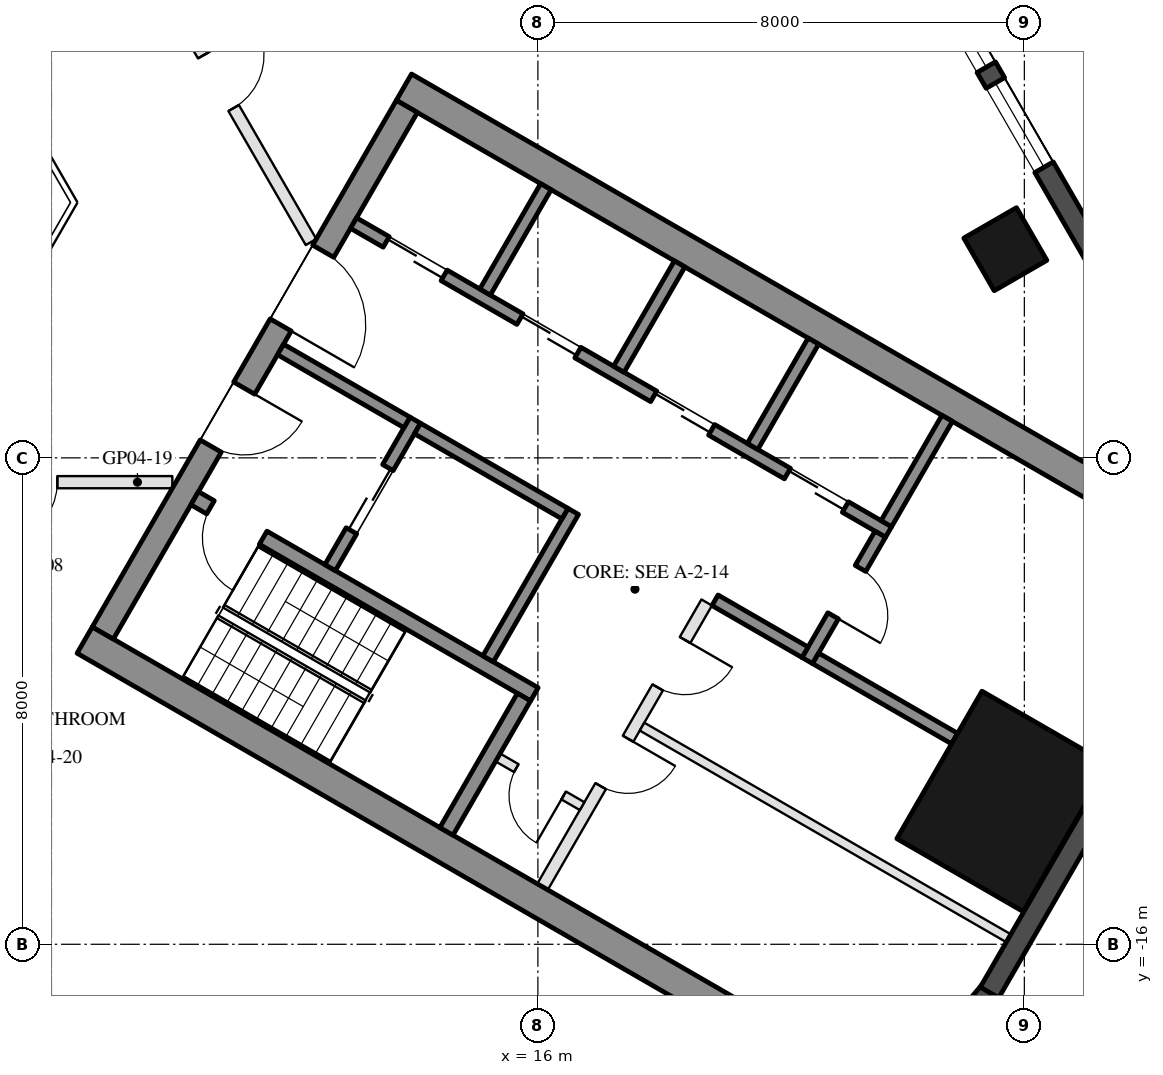
"""IFC4 building model, lengths in metres.
Left out: names, types, materials, properties, quantities, classifications, styles, units other than length and angle.
Written with IfcOpenShell. Run it as: python <this file> out.ifc"""

import sys

from ifc_helpers import new_model, si_unit, direction, frame, frame_2d, origin, origin_2d, place, context, subcontext, project, spatial, rectangle, hollow_rectangle, extrude, element, fill, save


model = new_model("IFC4")
c1 = context("Model", 3, precision=1e-05, world=origin(), true_north=direction((0.0, 1.0)))
c2 = subcontext(c1, "Body", "Model", "MODEL_VIEW")
j1 = project(units=[si_unit("LENGTHUNIT", "METRE"), si_unit("PLANEANGLEUNIT", "RADIAN")], contexts=[c1])
p1 = place(None, origin())
s1 = spatial("IfcSite", under=j1, at=p1, CompositionType="ELEMENT")
p2 = place(p1, origin())
s2 = spatial("IfcBuilding", under=s1, at=p2, CompositionType="ELEMENT")
p3 = place(p2, frame((0.0, 0.0, 72.4)))
s3 = spatial("IfcBuildingStorey", under=s2, at=p3, CompositionType="ELEMENT", Elevation=72.4)
p4 = place(p3, frame((23.688, -4.568, 0.0), z_axis=(0.0, 0.0, 1.0), x_axis=(-0.5, 0.866025403784, 0.0)))
e1 = element("IfcColumn", 1, at=p4, inside=s3, PredefinedType="COLUMN", context=c2, shape_type="SweptSolid", body=[
    extrude(hollow_rectangle(XDim=1.0, YDim=1.0, WallThickness=0.045, at=origin_2d()), origin(), (0.0, 0.0, 1.0), 3.7),
])
p5 = place(p3, frame((23.643, -13.65, 0.0), z_axis=(0.0, 0.0, 1.0), x_axis=(0.5, 0.866025403784, 0.0)))
e2 = element("IfcColumn", 2, at=p5, inside=s3, PredefinedType="COLUMN", context=c2, shape_type="SweptSolid", body=[
    extrude(hollow_rectangle(XDim=2.8, YDim=2.4, WallThickness=0.07, at=origin_2d()), origin(), (0.0, 0.0, 1.0), 3.7),
])
p6 = place(p3, frame((22.217, -18.231, 0.0), z_axis=(0.0, 0.0, 1.0), x_axis=(0.642733291068, 0.76609001857, 0.0)))
e3 = element("IfcWall", 3, at=p6, inside=s3, PredefinedType="SOLIDWALL", context=c2, shape_type="SweptSolid", body=[
    extrude(rectangle(XDim=1.91, YDim=0.35, at=frame_2d((0.955, 0.0))), origin(), (0.0, 0.0, 1.0), 3.55),
])
p7 = place(p3, frame((23.427, -16.792, 0.0), z_axis=(0.0, 0.0, 1.0), x_axis=(0.500018773155, 0.866014564827, 0.0)))
e4 = element("IfcWall", 4, at=p7, inside=s3, PredefinedType="SOLIDWALL", context=c2, shape_type="SweptSolid", body=[
    extrude(rectangle(XDim=5.658, YDim=0.35, at=frame_2d((2.829, 0.0))), origin(), (0.0, 0.0, 1.0), 3.55),
])
p8 = place(p3, frame((26.257, -6.567, 0.0), z_axis=(0.0, 0.0, 1.0), x_axis=(-0.500023526245, 0.866011820475, 0.0)))
e5 = element("IfcWall", 5, at=p8, inside=s3, PredefinedType="SOLIDWALL", context=c2, shape_type="SweptSolid", body=[
    extrude(rectangle(XDim=11.816, YDim=0.35, at=frame_2d((5.908, 0.0))), origin(), (0.0, 0.0, 1.0), 3.55),
])
p9 = place(p8, frame((0.38, 0.0, 0.3)))
e6 = element("IfcOpeningElement", 6, at=p9, cuts=e5, PredefinedType="OPENING", context=c2, shape_type="SweptSolid", body=[
    extrude(rectangle(XDim=1.7, YDim=2.65, at=frame_2d((0.85, 1.325))), frame((0.0, 0.185, 0.0), z_axis=(0.0, -1.0, 0.0), x_axis=(1.0, 0.0, 0.0)), (0.0, 0.0, 1.0), 0.37),
])
p10 = place(p8, frame((7.666, 0.0, 0.0)))
e7 = element("IfcOpeningElement", 7, at=p10, cuts=e5, PredefinedType="OPENING", context=c2, shape_type="SweptSolid", body=[
    extrude(rectangle(XDim=2.4, YDim=2.4, at=frame_2d((1.2, 1.2))), frame((0.0, 0.185, 0.0), z_axis=(0.0, -1.0, 0.0), x_axis=(1.0, 0.0, 0.0)), (0.0, 0.0, 1.0), 0.37),
])
p11 = place(p8, frame((3.865, 0.0, 0.3)))
e8 = element("IfcOpeningElement", 8, at=p11, cuts=e5, PredefinedType="OPENING", context=c2, shape_type="SweptSolid", body=[
    extrude(rectangle(XDim=1.6, YDim=2.65, at=frame_2d((0.8, 1.325))), frame((0.0, 0.185, 0.0), z_axis=(0.0, -1.0, 0.0), x_axis=(1.0, 0.0, 0.0)), (0.0, 0.0, 1.0), 0.37),
])
p12 = place(p8, frame((5.765, 0.0, 0.3)))
e9 = element("IfcOpeningElement", 9, at=p12, cuts=e5, PredefinedType="OPENING", context=c2, shape_type="SweptSolid", body=[
    extrude(rectangle(XDim=1.6, YDim=2.65, at=frame_2d((0.8, 1.325))), frame((0.0, 0.185, 0.0), z_axis=(0.0, -1.0, 0.0), x_axis=(1.0, 0.0, 0.0)), (0.0, 0.0, 1.0), 0.37),
])
for number, where, z_axis, x_axis in (
    (10, (8.547, -10.997, 0.0), (0.0, 0.0, 1.0), (0.866, -0.5, 0.0)),
    (11, (13.797, -1.903, 0.0), (0.0, 0.0, 1.0), (0.866, -0.5, 0.0)),
):
    element("IfcWall", number, at=place(p3, frame(where, z_axis=z_axis, x_axis=x_axis)), inside=s3, PredefinedType="SHEAR", context=c2, shape_type="SweptSolid", body=[
        extrude(rectangle(XDim=14.837, YDim=0.5, at=frame_2d((7.418, 0.0))), origin(), (0.0, 0.0, 1.0), 3.5),
    ])
p13 = place(p3, frame((8.845, -10.88, 0.0), z_axis=(0.0, 0.0, 1.0), x_axis=(0.500004234368, 0.866022959057, 0.0)))
e12 = element("IfcWall", 12, at=p13, inside=s3, PredefinedType="SHEAR", context=c2, shape_type="SweptSolid", body=[
    extrude(rectangle(XDim=10.0, YDim=0.4, at=frame_2d((5.0, 0.0))), origin(), (0.0, 0.0, 1.0), 3.5),
])
p14 = place(p13, frame((3.55, 0.0, 0.0)))
e13 = element("IfcOpeningElement", 13, at=p14, cuts=e12, PredefinedType="OPENING", context=c2, shape_type="SweptSolid", body=[
    extrude(rectangle(XDim=1.1, YDim=2.1, at=frame_2d((0.55, 1.05))), frame((0.0, 0.21, 0.0), z_axis=(0.0, -1.0, 0.0), x_axis=(1.0, 0.0, 0.0)), (0.0, 0.0, 1.0), 0.42),
])
p15 = place(p13, frame((5.85, 0.0, 0.0)))
e14 = element("IfcOpeningElement", 14, at=p15, cuts=e12, PredefinedType="OPENING", context=c2, shape_type="SweptSolid", body=[
    extrude(rectangle(XDim=1.4, YDim=2.1, at=frame_2d((0.7, 1.05))), frame((0.0, 0.21, 0.0), z_axis=(0.0, -1.0, 0.0), x_axis=(1.0, 0.0, 0.0)), (0.0, 0.0, 1.0), 0.42),
])
p16 = place(p3, frame((10.356, -8.664, 0.0), z_axis=(0.0, 0.0, 1.0), x_axis=(0.866028629588, -0.499994412703, 0.0)))
e15 = element("IfcWall", 15, at=p16, inside=s3, PredefinedType="SHEAR", context=c2, shape_type="SweptSolid", body=[
    extrude(rectangle(XDim=6.45, YDim=0.25, at=frame_2d((3.225, 0.0))), origin(), (0.0, 0.0, 1.0), 3.5),
])
p17 = place(p16, frame((0.3, 0.0, 0.0)))
e16 = element("IfcOpeningElement", 16, at=p17, cuts=e15, PredefinedType="OPENING", context=c2, shape_type="SweptSolid", body=[
    extrude(rectangle(XDim=1.0, YDim=2.1, at=frame_2d((0.5, 1.05))), frame((0.0, 0.135, 0.0), z_axis=(0.0, -1.0, 0.0), x_axis=(1.0, 0.0, 0.0)), (0.0, 0.0, 1.0), 0.27),
])
p18 = place(p3, frame((14.496, -14.143, 0.0), z_axis=(0.0, 0.0, 1.0), x_axis=(0.500062241894, 0.865989465428, 0.0)))
e17 = element("IfcWall", 17, at=p18, inside=s3, PredefinedType="SHEAR", context=c2, shape_type="SweptSolid", body=[
    extrude(rectangle(XDim=2.55, YDim=0.25, at=frame_2d((1.275, 0.0))), origin(), (0.0, 0.0, 1.0), 3.5),
])
p19 = place(p3, frame((15.181, -11.305, 0.0), z_axis=(0.0, 0.0, 1.0), x_axis=(0.49994636267, 0.866056369097, 0.0)))
e18 = element("IfcWall", 18, at=p19, inside=s3, PredefinedType="SHEAR", context=c2, shape_type="SweptSolid", body=[
    extrude(rectangle(XDim=2.8, YDim=0.2, at=frame_2d((1.4, 0.0))), origin(), (0.0, 0.0, 1.0), 3.5),
])
p20 = place(p3, frame((12.583, -9.805, 0.0), z_axis=(0.0, 0.0, 1.0), x_axis=(0.49994636267, 0.866056369097, 0.0)))
e19 = element("IfcWall", 19, at=p20, inside=s3, PredefinedType="SHEAR", context=c2, shape_type="SweptSolid", body=[
    extrude(rectangle(XDim=2.8, YDim=0.2, at=frame_2d((1.4, 0.0))), origin(), (0.0, 0.0, 1.0), 3.5),
])
p21 = place(p20, frame((0.7, 0.0, 0.0)))
e20 = element("IfcOpeningElement", 20, at=p21, cuts=e19, PredefinedType="OPENING", context=c2, shape_type="SweptSolid", body=[
    extrude(rectangle(XDim=1.2, YDim=2.1, at=frame_2d((0.6, 1.05))), frame((0.0, 0.11, 0.0), z_axis=(0.0, -1.0, 0.0), x_axis=(1.0, 0.0, 0.0)), (0.0, 0.0, 1.0), 0.22),
])
p22 = place(p3, frame((11.768, -6.217, 0.0), z_axis=(0.0, 0.0, 1.0), x_axis=(0.866050077142, -0.499957262057, 0.0)))
e21 = element("IfcWall", 21, at=p22, inside=s3, PredefinedType="SHEAR", context=c2, shape_type="SweptSolid", body=[
    extrude(rectangle(XDim=2.4, YDim=0.2, at=frame_2d((1.2, 0.0))), origin(), (0.0, 0.0, 1.0), 3.5),
])
p23 = place(p3, frame((14.02, -7.517, 0.0), z_axis=(0.0, 0.0, 1.0), x_axis=(0.866034573852, -0.49998411664, 0.0)))
e22 = element("IfcWall", 22, at=p23, inside=s3, PredefinedType="SHEAR", context=c2, shape_type="SweptSolid", body=[
    extrude(rectangle(XDim=2.8, YDim=0.2, at=frame_2d((1.4, 0.0))), origin(), (0.0, 0.0, 1.0), 3.5),
])
p24 = place(p3, frame((12.968, -4.138, 0.0), z_axis=(0.0, 0.0, 1.0), x_axis=(0.866028328073, -0.49999493495, 0.0)))
e23 = element("IfcWall", 23, at=p24, inside=s3, PredefinedType="SHEAR", context=c2, shape_type="SweptSolid", body=[
    extrude(rectangle(XDim=10.16, YDim=0.2, at=frame_2d((5.08, 0.0))), origin(), (0.0, 0.0, 1.0), 3.5),
])
p25 = place(p24, frame((0.62, 0.0, 0.0)))
e24 = element("IfcOpeningElement", 24, at=p25, cuts=e23, PredefinedType="OPENING", context=c2, shape_type="SweptSolid", body=[
    extrude(rectangle(XDim=1.1, YDim=2.1, at=frame_2d((0.55, 1.05))), frame((0.0, 0.11, 0.0), z_axis=(0.0, -1.0, 0.0), x_axis=(1.0, 0.0, 0.0)), (0.0, 0.0, 1.0), 0.22),
])
p26 = place(p24, frame((3.16, 0.0, 0.0)))
e25 = element("IfcOpeningElement", 25, at=p26, cuts=e23, PredefinedType="OPENING", context=c2, shape_type="SweptSolid", body=[
    extrude(rectangle(XDim=1.1, YDim=2.1, at=frame_2d((0.55, 1.05))), frame((0.0, 0.11, 0.0), z_axis=(0.0, -1.0, 0.0), x_axis=(1.0, 0.0, 0.0)), (0.0, 0.0, 1.0), 0.22),
])
p27 = place(p24, frame((5.7, 0.0, 0.0)))
e26 = element("IfcOpeningElement", 26, at=p27, cuts=e23, PredefinedType="OPENING", context=c2, shape_type="SweptSolid", body=[
    extrude(rectangle(XDim=1.1, YDim=2.1, at=frame_2d((0.55, 1.05))), frame((0.0, 0.11, 0.0), z_axis=(0.0, -1.0, 0.0), x_axis=(1.0, 0.0, 0.0)), (0.0, 0.0, 1.0), 0.22),
])
p28 = place(p24, frame((8.24, 0.0, 0.0)))
e27 = element("IfcOpeningElement", 27, at=p28, cuts=e23, PredefinedType="OPENING", context=c2, shape_type="SweptSolid", body=[
    extrude(rectangle(XDim=1.1, YDim=2.1, at=frame_2d((0.55, 1.05))), frame((0.0, 0.11, 0.0), z_axis=(0.0, -1.0, 0.0), x_axis=(1.0, 0.0, 0.0)), (0.0, 0.0, 1.0), 0.22),
])
p29 = place(p3, frame((20.43, -11.333, 0.0), z_axis=(0.0, 0.0, 1.0), x_axis=(0.500001309137, 0.866024647952, 0.0)))
e28 = element("IfcWall", 28, at=p29, inside=s3, PredefinedType="SHEAR", context=c2, shape_type="SweptSolid", body=[
    extrude(rectangle(XDim=2.4, YDim=0.2, at=frame_2d((1.2, 0.0))), origin(), (0.0, 0.0, 1.0), 3.5),
])
p30 = place(p29, frame((0.85, 0.0, 0.0)))
e29 = element("IfcOpeningElement", 29, at=p30, cuts=e28, PredefinedType="OPENING", context=c2, shape_type="SweptSolid", body=[
    extrude(rectangle(XDim=0.9, YDim=2.1, at=frame_2d((0.45, 1.05))), frame((0.0, 0.11, 0.0), z_axis=(0.0, -1.0, 0.0), x_axis=(1.0, 0.0, 0.0)), (0.0, 0.0, 1.0), 0.22),
])
p31 = place(p3, frame((18.913, -10.342, 0.0), z_axis=(0.0, 0.0, 1.0), x_axis=(0.866038183914, -0.499977863513, 0.0)))
e30 = element("IfcWall", 30, at=p31, inside=s3, PredefinedType="SHEAR", context=c2, shape_type="SweptSolid", body=[
    extrude(rectangle(XDim=1.71, YDim=0.2, at=frame_2d((0.855, 0.0))), origin(), (0.0, 0.0, 1.0), 3.5),
])
for number, where, z_axis, x_axis in (
    (31, (15.131, -5.272, 0.0), (0.0, 0.0, 1.0), (0.5, 0.866, 0.0)),
    (32, (17.331, -6.542, 0.0), (0.0, 0.0, 1.0), (0.5, 0.866, 0.0)),
    (33, (19.531, -7.812, 0.0), (0.0, 0.0, 1.0), (0.5, 0.866, 0.0)),
    (34, (21.73, -9.082, 0.0), (0.0, 0.0, 1.0), (0.5, 0.866, 0.0)),
):
    element("IfcWall", number, at=place(p3, frame(where, z_axis=z_axis, x_axis=x_axis)), inside=s3, PredefinedType="SHEAR", context=c2, shape_type="SweptSolid", body=[
        extrude(rectangle(XDim=2.0, YDim=0.2, at=frame_2d((1.0, 0.0))), origin(), (0.0, 0.0, 1.0), 3.5),
    ])
p32 = place(p3, frame((20.567, -11.297, 0.0), z_axis=(0.0, 0.0, 1.0), x_axis=(0.866060851709, -0.499938597367, 0.0)))
e35 = element("IfcWall", 35, at=p32, inside=s3, PredefinedType="SHEAR", context=c2, shape_type="SweptSolid", body=[
    extrude(rectangle(XDim=2.64, YDim=0.2, at=frame_2d((1.32, 0.0))), origin(), (0.0, 0.0, 1.0), 3.5),
])
p33 = place(p3, frame((16.076, -15.055, 0.0), z_axis=(0.0, 0.0, 1.0), x_axis=(0.499995103361, 0.866028230842, 0.0)))
e36 = element("IfcWall", 36, at=p33, inside=s3, PredefinedType="PARTITIONING", context=c2, shape_type="SweptSolid", body=[
    extrude(rectangle(XDim=5.4, YDim=0.2, at=frame_2d((2.7, 0.0))), origin(), (0.0, 0.0, 1.0), 3.5),
])
p34 = place(p33, frame((1.913, 0.0, 0.0)))
e37 = element("IfcOpeningElement", 37, at=p34, cuts=e36, PredefinedType="OPENING", context=c2, shape_type="SweptSolid", body=[
    extrude(rectangle(XDim=0.9, YDim=2.1, at=frame_2d((0.45, 1.05))), frame((0.0, 0.11, 0.0), z_axis=(0.0, -1.0, 0.0), x_axis=(1.0, 0.0, 0.0)), (0.0, 0.0, 1.0), 0.22),
])
p35 = place(p33, frame((3.788, 0.0, 0.0)))
e38 = element("IfcOpeningElement", 38, at=p35, cuts=e36, PredefinedType="OPENING", context=c2, shape_type="SweptSolid", body=[
    extrude(rectangle(XDim=0.9, YDim=2.1, at=frame_2d((0.45, 1.05))), frame((0.0, 0.11, 0.0), z_axis=(0.0, -1.0, 0.0), x_axis=(1.0, 0.0, 0.0)), (0.0, 0.0, 1.0), 0.22),
])
p36 = place(p3, frame((15.342, -12.928, 0.0), z_axis=(0.0, 0.0, 1.0), x_axis=(0.865989903783, -0.500061482766, 0.0)))
e39 = element("IfcWall", 39, at=p36, inside=s3, PredefinedType="PARTITIONING", context=c2, shape_type="SweptSolid", body=[
    extrude(rectangle(XDim=1.6, YDim=0.15, at=frame_2d((0.8, 0.0))), origin(), (0.0, 0.0, 1.0), 3.5),
])
p37 = place(p36, frame((0.35, 0.0, 0.0)))
e40 = element("IfcOpeningElement", 40, at=p37, cuts=e39, PredefinedType="OPENING", context=c2, shape_type="SweptSolid", body=[
    extrude(rectangle(XDim=0.9, YDim=2.1, at=frame_2d((0.45, 1.05))), frame((0.0, 0.085, 0.0), z_axis=(0.0, -1.0, 0.0), x_axis=(1.0, 0.0, 0.0)), (0.0, 0.0, 1.0), 0.17),
])
p38 = place(p3, frame((17.713, -12.42, 0.0), z_axis=(0.0, 0.0, 1.0), x_axis=(0.866016523273, -0.500015381182, 0.0)))
e41 = element("IfcWall", 41, at=p38, inside=s3, PredefinedType="PARTITIONING", context=c2, shape_type="SweptSolid", body=[
    extrude(rectangle(XDim=6.95, YDim=0.15, at=frame_2d((3.475, 0.0))), origin(), (0.0, 0.0, 1.0), 3.5),
])
p39 = place(p3, frame((9.988, -8.4, 0.0), z_axis=(0.0, 0.0, 1.0), x_axis=(-1.0, 0.0, 0.0)))
e42 = element("IfcWall", 42, at=p39, inside=s3, PredefinedType="PARTITIONING", context=c2, shape_type="SweptSolid", body=[
    extrude(rectangle(XDim=4.783, YDim=0.2, at=frame_2d((2.392, 0.0))), origin(), (0.0, 0.0, 1.0), 2.95),
])
p40 = place(p39, frame((1.892, 0.0, 0.0)))
e43 = element("IfcOpeningElement", 43, at=p40, cuts=e42, PredefinedType="OPENING", context=c2, shape_type="SweptSolid", body=[
    extrude(rectangle(XDim=1.0, YDim=2.1, at=frame_2d((0.5, 1.05))), frame((0.0, 0.11, 0.0), z_axis=(0.0, -1.0, 0.0), x_axis=(1.0, 0.0, 0.0)), (0.0, 0.0, 1.0), 0.22),
])
p41 = place(p3, frame((9.224, 0.824, 0.0), z_axis=(0.0, 0.0, 1.0), x_axis=(0.500019749946, -0.866014000848, 0.0)))
e44 = element("IfcWall", 44, at=p41, inside=s3, PredefinedType="PARTITIONING", context=c2, shape_type="SweptSolid", body=[
    extrude(rectangle(XDim=6.09, YDim=0.2, at=frame_2d((3.045, 0.0))), origin(), (0.0, 0.0, 1.0), 2.95),
])
p42 = place(p41, frame((2.545, 0.0, 0.0)))
e45 = element("IfcOpeningElement", 45, at=p42, cuts=e44, PredefinedType="OPENING", context=c2, shape_type="SweptSolid", body=[
    extrude(rectangle(XDim=1.0, YDim=2.1, at=frame_2d((0.5, 1.05))), frame((0.0, 0.11, 0.0), z_axis=(0.0, -1.0, 0.0), x_axis=(1.0, 0.0, 0.0)), (0.0, 0.0, 1.0), 0.22),
])
p43 = place(p11, origin())
e46 = element("IfcWindow", 46, at=p43, inside=s3, PartitioningType="SINGLE_PANEL", PredefinedType="WINDOW", context=c2, shape_type="SweptSolid", body=[
    extrude(rectangle(XDim=1.6, YDim=2.65, at=frame_2d((0.8, 1.325))), frame((0.0, 0.03, 0.0), z_axis=(0.0, -1.0, 0.0), x_axis=(1.0, 0.0, 0.0)), (0.0, 0.0, 1.0), 0.06),
])
fill(e8, e46)
p44 = place(p12, origin())
e47 = element("IfcWindow", 47, at=p44, inside=s3, PartitioningType="SINGLE_PANEL", PredefinedType="WINDOW", context=c2, shape_type="SweptSolid", body=[
    extrude(rectangle(XDim=1.6, YDim=2.65, at=frame_2d((0.8, 1.325))), frame((0.0, 0.03, 0.0), z_axis=(0.0, -1.0, 0.0), x_axis=(1.0, 0.0, 0.0)), (0.0, 0.0, 1.0), 0.06),
])
fill(e9, e47)
p45 = place(p21, origin())
e48 = element("IfcDoor", 48, at=p45, inside=s3, OperationType="DOUBLE_DOOR_SLIDING", PredefinedType="DOOR", context=c2, shape_type="SweptSolid", body=[
    extrude(rectangle(XDim=1.2, YDim=2.1, at=frame_2d((0.6, 1.05))), frame((0.0, 0.025, 0.0), z_axis=(0.0, -1.0, 0.0), x_axis=(1.0, 0.0, 0.0)), (0.0, 0.0, 1.0), 0.05),
])
fill(e20, e48)
p46 = place(p37, frame((0.9, 0.0, 0.0), z_axis=(0.0, 0.0, 1.0), x_axis=(-1.0, 0.0, 0.0)))
e49 = element("IfcDoor", 49, at=p46, inside=s3, OperationType="SINGLE_SWING_LEFT", PredefinedType="DOOR", context=c2, shape_type="SweptSolid", body=[
    extrude(rectangle(XDim=0.9, YDim=2.1, at=frame_2d((0.45, 1.05))), frame((0.0, 0.025, 0.0), z_axis=(0.0, -1.0, 0.0), x_axis=(1.0, 0.0, 0.0)), (0.0, 0.0, 1.0), 0.05),
])
fill(e40, e49)
p47 = place(p25, origin())
e50 = element("IfcDoor", 50, at=p47, inside=s3, OperationType="DOUBLE_DOOR_SLIDING", PredefinedType="DOOR", context=c2, shape_type="SweptSolid", body=[
    extrude(rectangle(XDim=1.1, YDim=2.1, at=frame_2d((0.55, 1.05))), frame((0.0, 0.025, 0.0), z_axis=(0.0, -1.0, 0.0), x_axis=(1.0, 0.0, 0.0)), (0.0, 0.0, 1.0), 0.05),
])
fill(e24, e50)
p48 = place(p26, origin())
e51 = element("IfcDoor", 51, at=p48, inside=s3, OperationType="DOUBLE_DOOR_SLIDING", PredefinedType="DOOR", context=c2, shape_type="SweptSolid", body=[
    extrude(rectangle(XDim=1.1, YDim=2.1, at=frame_2d((0.55, 1.05))), frame((0.0, 0.025, 0.0), z_axis=(0.0, -1.0, 0.0), x_axis=(1.0, 0.0, 0.0)), (0.0, 0.0, 1.0), 0.05),
])
fill(e25, e51)
p49 = place(p27, origin())
e52 = element("IfcDoor", 52, at=p49, inside=s3, OperationType="DOUBLE_DOOR_SLIDING", PredefinedType="DOOR", context=c2, shape_type="SweptSolid", body=[
    extrude(rectangle(XDim=1.1, YDim=2.1, at=frame_2d((0.55, 1.05))), frame((0.0, 0.025, 0.0), z_axis=(0.0, -1.0, 0.0), x_axis=(1.0, 0.0, 0.0)), (0.0, 0.0, 1.0), 0.05),
])
fill(e26, e52)
p50 = place(p28, origin())
e53 = element("IfcDoor", 53, at=p50, inside=s3, OperationType="DOUBLE_DOOR_SLIDING", PredefinedType="DOOR", context=c2, shape_type="SweptSolid", body=[
    extrude(rectangle(XDim=1.1, YDim=2.1, at=frame_2d((0.55, 1.05))), frame((0.0, 0.025, 0.0), z_axis=(0.0, -1.0, 0.0), x_axis=(1.0, 0.0, 0.0)), (0.0, 0.0, 1.0), 0.05),
])
fill(e27, e53)
p51 = place(p30, frame((0.9, 0.0, 0.0), z_axis=(0.0, 0.0, 1.0), x_axis=(-1.0, 0.0, 0.0)))
e54 = element("IfcDoor", 54, at=p51, inside=s3, OperationType="SINGLE_SWING_RIGHT", PredefinedType="DOOR", context=c2, shape_type="SweptSolid", body=[
    extrude(rectangle(XDim=0.9, YDim=2.1, at=frame_2d((0.45, 1.05))), frame((0.0, 0.025, 0.0), z_axis=(0.0, -1.0, 0.0), x_axis=(1.0, 0.0, 0.0)), (0.0, 0.0, 1.0), 0.05),
])
fill(e29, e54)
p52 = place(p34, frame((0.9, 0.0, 0.0), z_axis=(0.0, 0.0, 1.0), x_axis=(-1.0, 0.0, 0.0)))
e55 = element("IfcDoor", 55, at=p52, inside=s3, OperationType="SINGLE_SWING_LEFT", PredefinedType="DOOR", context=c2, shape_type="SweptSolid", body=[
    extrude(rectangle(XDim=0.9, YDim=2.1, at=frame_2d((0.45, 1.05))), frame((0.0, 0.025, 0.0), z_axis=(0.0, -1.0, 0.0), x_axis=(1.0, 0.0, 0.0)), (0.0, 0.0, 1.0), 0.05),
])
fill(e37, e55)
p53 = place(p35, frame((0.9, 0.0, 0.0), z_axis=(0.0, 0.0, 1.0), x_axis=(-1.0, 0.0, 0.0)))
e56 = element("IfcDoor", 56, at=p53, inside=s3, OperationType="SINGLE_SWING_LEFT", PredefinedType="DOOR", context=c2, shape_type="SweptSolid", body=[
    extrude(rectangle(XDim=0.9, YDim=2.1, at=frame_2d((0.45, 1.05))), frame((0.0, 0.025, 0.0), z_axis=(0.0, -1.0, 0.0), x_axis=(1.0, 0.0, 0.0)), (0.0, 0.0, 1.0), 0.05),
])
fill(e38, e56)
p54 = place(p14, frame((1.1, 0.0, 0.0), z_axis=(0.0, 0.0, 1.0), x_axis=(-1.0, 0.0, 0.0)))
e57 = element("IfcDoor", 57, at=p54, inside=s3, OperationType="SINGLE_SWING_LEFT", PredefinedType="DOOR", context=c2, shape_type="SweptSolid", body=[
    extrude(rectangle(XDim=1.1, YDim=2.1, at=frame_2d((0.55, 1.05))), frame((0.0, 0.025, 0.0), z_axis=(0.0, -1.0, 0.0), x_axis=(1.0, 0.0, 0.0)), (0.0, 0.0, 1.0), 0.05),
])
fill(e13, e57)
p55 = place(p15, frame((1.4, 0.0, 0.0), z_axis=(0.0, 0.0, 1.0), x_axis=(-1.0, 0.0, 0.0)))
e58 = element("IfcDoor", 58, at=p55, inside=s3, OperationType="DOUBLE_DOOR_SINGLE_SWING", PredefinedType="DOOR", context=c2, shape_type="SweptSolid", body=[
    extrude(rectangle(XDim=1.4, YDim=2.1, at=frame_2d((0.7, 1.05))), frame((0.0, 0.025, 0.0), z_axis=(0.0, -1.0, 0.0), x_axis=(1.0, 0.0, 0.0)), (0.0, 0.0, 1.0), 0.05),
])
fill(e14, e58)
p56 = place(p17, frame((1.0, 0.0, 0.0), z_axis=(0.0, 0.0, 1.0), x_axis=(-1.0, 0.0, 0.0)))
e59 = element("IfcDoor", 59, at=p56, inside=s3, OperationType="SINGLE_SWING_LEFT", PredefinedType="DOOR", context=c2, shape_type="SweptSolid", body=[
    extrude(rectangle(XDim=1.0, YDim=2.1, at=frame_2d((0.5, 1.05))), frame((0.0, 0.025, 0.0), z_axis=(0.0, -1.0, 0.0), x_axis=(1.0, 0.0, 0.0)), (0.0, 0.0, 1.0), 0.05),
])
fill(e16, e59)
p57 = place(p40, origin())
e60 = element("IfcDoor", 60, at=p57, inside=s3, OperationType="SINGLE_SWING_RIGHT", PredefinedType="DOOR", context=c2, shape_type="SweptSolid", body=[
    extrude(rectangle(XDim=1.0, YDim=2.1, at=frame_2d((0.5, 1.05))), frame((0.0, 0.025, 0.0), z_axis=(0.0, -1.0, 0.0), x_axis=(1.0, 0.0, 0.0)), (0.0, 0.0, 1.0), 0.05),
])
fill(e43, e60)
p58 = place(p42, origin())
e61 = element("IfcDoor", 61, at=p58, inside=s3, OperationType="SINGLE_SWING_LEFT", PredefinedType="DOOR", context=c2, shape_type="SweptSolid", body=[
    extrude(rectangle(XDim=1.0, YDim=2.1, at=frame_2d((0.5, 1.05))), frame((0.0, 0.025, 0.0), z_axis=(0.0, -1.0, 0.0), x_axis=(1.0, 0.0, 0.0)), (0.0, 0.0, 1.0), 0.05),
])
fill(e45, e61)
save(model, sys.argv[1])
